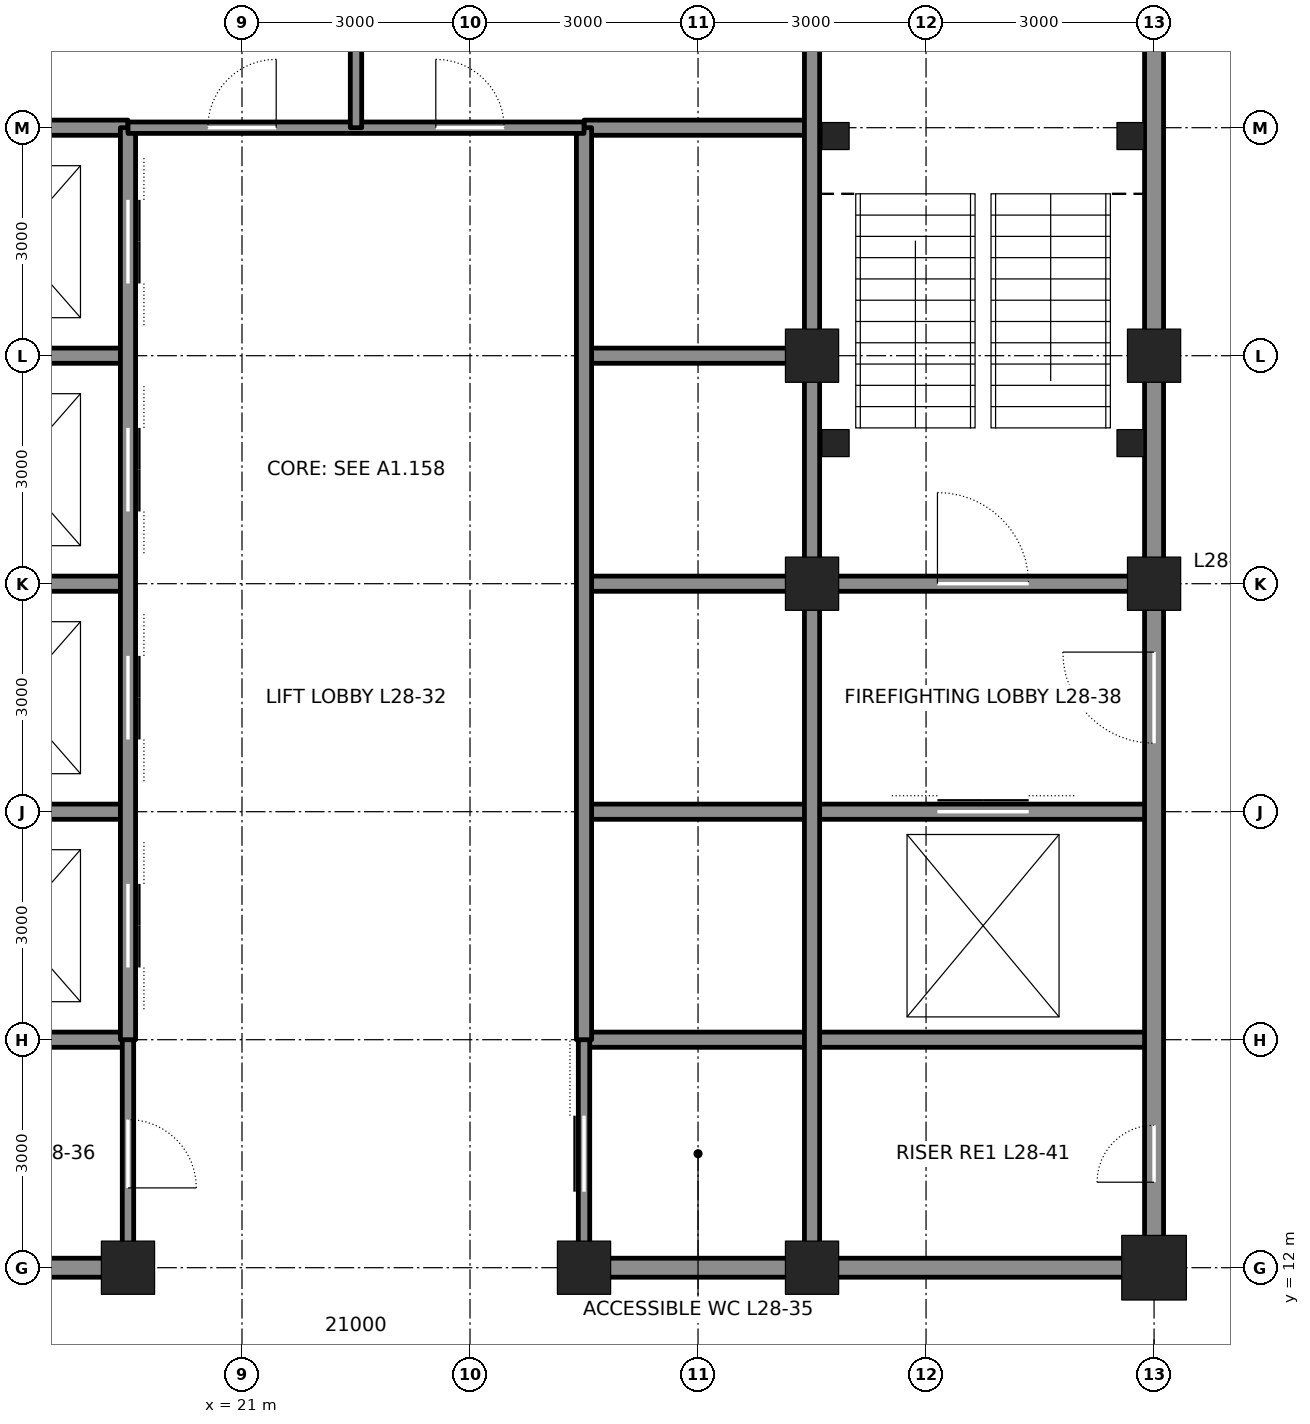
"""IFC4 building model, lengths in metres.
Left out: names, types, materials, properties, quantities, classifications, styles, units other than length and angle.
Written with IfcOpenShell. Run it as: python <this file> out.ifc"""

import sys

from ifc_helpers import new_model, si_unit, direction, frame, frame_2d, origin, origin_2d, place, context, subcontext, project, spatial, rectangle, hollow_rectangle, extrude, element, fill, save


model = new_model("IFC4")
c1 = context("Model", 3, precision=1e-05, world=origin(), true_north=direction((0.0, 1.0)))
c2 = subcontext(c1, "Body", "Model", "MODEL_VIEW")
j1 = project(units=[si_unit("LENGTHUNIT", "METRE"), si_unit("PLANEANGLEUNIT", "RADIAN")], contexts=[c1])
p1 = place(None, origin())
s1 = spatial("IfcSite", under=j1, at=p1, CompositionType="ELEMENT")
p2 = place(p1, origin())
s2 = spatial("IfcBuilding", under=s1, at=p2, CompositionType="ELEMENT")
p3 = place(p2, frame((0.0, 0.0, 132.0)))
s3 = spatial("IfcBuildingStorey", under=s2, at=p3, CompositionType="ELEMENT", Elevation=132.0)
for number, where, z_axis, x_axis in (
    (1, (19.5, 12.0, 0.0), (0.0, 0.0, 1.0), (1.0, 0.0, 0.0)),
    (2, (25.5, 12.0, 0.0), (0.0, 0.0, 1.0), (1.0, 0.0, 0.0)),
    (3, (28.5, 12.0, 0.0), (0.0, 0.0, 1.0), (1.0, 0.0, 0.0)),
):
    element("IfcColumn", number, at=place(p3, frame(where, z_axis=z_axis, x_axis=x_axis)), inside=s3, PredefinedType="COLUMN", context=c2, shape_type="SweptSolid", body=[
        extrude(hollow_rectangle(XDim=0.7, YDim=0.7, WallThickness=0.07, at=origin_2d()), origin(), (0.0, 0.0, 1.0), 4.2),
    ])
p4 = place(p3, frame((33.0, 12.0, 0.0), z_axis=(0.0, 0.0, 1.0), x_axis=(1.0, 0.0, 0.0)))
e4 = element("IfcColumn", 4, at=p4, inside=s3, PredefinedType="COLUMN", context=c2, shape_type="SweptSolid", body=[
    extrude(hollow_rectangle(XDim=0.85, YDim=0.85, WallThickness=0.085, at=origin_2d()), origin(), (0.0, 0.0, 1.0), 4.2),
])
for number, where, z_axis, x_axis in (
    (5, (33.0, 21.0, 0.0), (0.0, 0.0, 1.0), (1.0, 0.0, 0.0)),
    (6, (33.0, 24.0, 0.0), (0.0, 0.0, 1.0), (1.0, 0.0, 0.0)),
    (7, (28.5, 21.0, 0.0), (0.0, 0.0, 1.0), (1.0, 0.0, 0.0)),
    (8, (28.5, 24.0, 0.0), (0.0, 0.0, 1.0), (1.0, 0.0, 0.0)),
):
    element("IfcColumn", number, at=place(p3, frame(where, z_axis=z_axis, x_axis=x_axis)), inside=s3, PredefinedType="COLUMN", context=c2, shape_type="SweptSolid", body=[
        extrude(hollow_rectangle(XDim=0.7, YDim=0.7, WallThickness=0.07, at=origin_2d()), origin(), (0.0, 0.0, 1.0), 4.2),
    ])
for number, where, z_axis, x_axis in (
    (9, (16.75, 12.0, 0.0), (0.0, 0.0, 1.0), (1.0, 0.0, 0.0)),
    (10, (25.75, 12.0, 0.0), (0.0, 0.0, 1.0), (1.0, 0.0, 0.0)),
):
    element("IfcWall", number, at=place(p3, frame(where, z_axis=z_axis, x_axis=x_axis)), inside=s3, PredefinedType="SOLIDWALL", context=c2, shape_type="SweptSolid", body=[
        extrude(rectangle(XDim=2.5, YDim=0.25, at=frame_2d((1.25, 0.0))), origin(), (0.0, 0.0, 1.0), 3.181),
    ])
p5 = place(p3, frame((28.75, 12.0, 0.0), z_axis=(0.0, 0.0, 1.0), x_axis=(1.0, 0.0, 0.0)))
e11 = element("IfcWall", 11, at=p5, inside=s3, PredefinedType="SOLIDWALL", context=c2, shape_type="SweptSolid", body=[
    extrude(rectangle(XDim=4.0, YDim=0.25, at=frame_2d((2.0, 0.0))), origin(), (0.0, 0.0, 1.0), 3.181),
])
for number, where, z_axis, x_axis in (
    (12, (12.0, 15.0, 0.0), (0.0, 0.0, 1.0), (1.0, 0.0, 0.0)),
    (13, (25.5, 15.0, 0.0), (0.0, 0.0, 1.0), (1.0, 0.0, 0.0)),
):
    element("IfcWall", number, at=place(p3, frame(where, z_axis=z_axis, x_axis=x_axis)), inside=s3, PredefinedType="SOLIDWALL", context=c2, shape_type="SweptSolid", body=[
        extrude(rectangle(XDim=7.5, YDim=0.2, at=frame_2d((3.75, 0.0))), origin(), (0.0, 0.0, 1.0), 4.04),
    ])
for number, where, z_axis, x_axis in (
    (14, (16.75, 24.0, 0.0), (0.0, 0.0, 1.0), (1.0, 0.0, 0.0)),
    (15, (25.5, 24.0, 0.0), (0.0, 0.0, 1.0), (1.0, 0.0, 0.0)),
):
    element("IfcWall", number, at=place(p3, frame(where, z_axis=z_axis, x_axis=x_axis)), inside=s3, PredefinedType="SOLIDWALL", context=c2, shape_type="SweptSolid", body=[
        extrude(rectangle(XDim=2.75, YDim=0.2, at=frame_2d((1.375, 0.0))), origin(), (0.0, 0.0, 1.0), 3.09),
    ])
p6 = place(p3, frame((12.0, 27.0, 0.0), z_axis=(0.0, 0.0, 1.0), x_axis=(1.0, 0.0, 0.0)))
e16 = element("IfcWall", 16, at=p6, inside=s3, PredefinedType="SOLIDWALL", context=c2, shape_type="SweptSolid", body=[
    extrude(rectangle(XDim=7.5, YDim=0.2, at=frame_2d((3.75, 0.0))), origin(), (0.0, 0.0, 1.0), 4.04),
])
p7 = place(p6, frame((1.65, 0.0, 0.0)))
e17 = element("IfcOpeningElement", 17, at=p7, cuts=e16, PredefinedType="OPENING", context=c2, shape_type="SweptSolid", body=[
    extrude(rectangle(XDim=1.2, YDim=2.1, at=frame_2d((0.6, 1.05))), frame((0.0, 0.11, 0.0), z_axis=(0.0, -1.0, 0.0), x_axis=(1.0, 0.0, 0.0)), (0.0, 0.0, 1.0), 0.22),
])
for number, where, z_axis, x_axis in (
    (18, (25.5, 27.0, 0.0), (0.0, 0.0, 1.0), (1.0, 0.0, 0.0)),
    (19, (16.5, 18.0, 0.0), (0.0, 0.0, 1.0), (1.0, 0.0, 0.0)),
):
    element("IfcWall", number, at=place(p3, frame(where, z_axis=z_axis, x_axis=x_axis)), inside=s3, PredefinedType="SOLIDWALL", context=c2, shape_type="SweptSolid", body=[
        extrude(rectangle(XDim=3.0, YDim=0.2, at=frame_2d((1.5, 0.0))), origin(), (0.0, 0.0, 1.0), 4.04),
    ])
p8 = place(p3, frame((25.5, 18.0, 0.0), z_axis=(0.0, 0.0, 1.0), x_axis=(1.0, 0.0, 0.0)))
e20 = element("IfcWall", 20, at=p8, inside=s3, PredefinedType="SOLIDWALL", context=c2, shape_type="SweptSolid", body=[
    extrude(rectangle(XDim=7.5, YDim=0.2, at=frame_2d((3.75, 0.0))), origin(), (0.0, 0.0, 1.0), 4.04),
])
p9 = place(p8, frame((4.65, 0.0, 0.0)))
e21 = element("IfcOpeningElement", 21, at=p9, cuts=e20, PredefinedType="OPENING", context=c2, shape_type="SweptSolid", body=[
    extrude(rectangle(XDim=1.2, YDim=2.1, at=frame_2d((0.6, 1.05))), frame((0.0, 0.11, 0.0), z_axis=(0.0, -1.0, 0.0), x_axis=(1.0, 0.0, 0.0)), (0.0, 0.0, 1.0), 0.22),
])
for number, where, z_axis, x_axis in (
    (22, (16.75, 21.0, 0.0), (0.0, 0.0, 1.0), (1.0, 0.0, 0.0)),
    (23, (25.5, 21.0, 0.0), (0.0, 0.0, 1.0), (1.0, 0.0, 0.0)),
):
    element("IfcWall", number, at=place(p3, frame(where, z_axis=z_axis, x_axis=x_axis)), inside=s3, PredefinedType="SOLIDWALL", context=c2, shape_type="SweptSolid", body=[
        extrude(rectangle(XDim=2.75, YDim=0.2, at=frame_2d((1.375, 0.0))), origin(), (0.0, 0.0, 1.0), 3.09),
    ])
p10 = place(p3, frame((28.75, 21.0, 0.0), z_axis=(0.0, 0.0, 1.0), x_axis=(1.0, 0.0, 0.0)))
e24 = element("IfcWall", 24, at=p10, inside=s3, PredefinedType="SOLIDWALL", context=c2, shape_type="SweptSolid", body=[
    extrude(rectangle(XDim=4.0, YDim=0.2, at=frame_2d((2.0, 0.0))), origin(), (0.0, 0.0, 1.0), 3.09),
])
p11 = place(p10, frame((1.4, 0.0, 0.0)))
e25 = element("IfcOpeningElement", 25, at=p11, cuts=e24, PredefinedType="OPENING", context=c2, shape_type="SweptSolid", body=[
    extrude(rectangle(XDim=1.2, YDim=2.1, at=frame_2d((0.6, 1.05))), frame((0.0, 0.11, 0.0), z_axis=(0.0, -1.0, 0.0), x_axis=(1.0, 0.0, 0.0)), (0.0, 0.0, 1.0), 0.22),
])
p12 = place(p3, frame((19.5, 12.25, 0.0), z_axis=(0.0, 0.0, 1.0), x_axis=(0.0, 1.0, 0.0)))
e26 = element("IfcWall", 26, at=p12, inside=s3, PredefinedType="PARTITIONING", context=c2, shape_type="SweptSolid", body=[
    extrude(rectangle(XDim=2.75, YDim=0.15, at=frame_2d((1.375, 0.0))), origin(), (0.0, 0.0, 1.0), 3.065),
])
p13 = place(p12, frame((0.8, 0.0, 0.0)))
e27 = element("IfcOpeningElement", 27, at=p13, cuts=e26, PredefinedType="OPENING", context=c2, shape_type="SweptSolid", body=[
    extrude(rectangle(XDim=0.9, YDim=2.1, at=frame_2d((0.45, 1.05))), frame((0.0, 0.085, 0.0), z_axis=(0.0, -1.0, 0.0), x_axis=(1.0, 0.0, 0.0)), (0.0, 0.0, 1.0), 0.17),
])
p14 = place(p3, frame((19.5, 15.0, 0.0), z_axis=(0.0, 0.0, 1.0), x_axis=(0.0, 1.0, 0.0)))
e28 = element("IfcWall", 28, at=p14, inside=s3, PredefinedType="SOLIDWALL", context=c2, shape_type="SweptSolid", body=[
    extrude(rectangle(XDim=12.0, YDim=0.2, at=frame_2d((6.0, 0.0))), origin(), (0.0, 0.0, 1.0), 3.065),
])
p15 = place(p14, frame((0.95, 0.0, 0.0)))
e29 = element("IfcOpeningElement", 29, at=p15, cuts=e28, PredefinedType="OPENING", context=c2, shape_type="SweptSolid", body=[
    extrude(rectangle(XDim=1.1, YDim=2.1, at=frame_2d((0.55, 1.05))), frame((0.0, 0.11, 0.0), z_axis=(0.0, -1.0, 0.0), x_axis=(1.0, 0.0, 0.0)), (0.0, 0.0, 1.0), 0.22),
])
p16 = place(p14, frame((3.95, 0.0, 0.0)))
e30 = element("IfcOpeningElement", 30, at=p16, cuts=e28, PredefinedType="OPENING", context=c2, shape_type="SweptSolid", body=[
    extrude(rectangle(XDim=1.1, YDim=2.1, at=frame_2d((0.55, 1.05))), frame((0.0, 0.11, 0.0), z_axis=(0.0, -1.0, 0.0), x_axis=(1.0, 0.0, 0.0)), (0.0, 0.0, 1.0), 0.22),
])
p17 = place(p14, frame((6.95, 0.0, 0.0)))
e31 = element("IfcOpeningElement", 31, at=p17, cuts=e28, PredefinedType="OPENING", context=c2, shape_type="SweptSolid", body=[
    extrude(rectangle(XDim=1.1, YDim=2.1, at=frame_2d((0.55, 1.05))), frame((0.0, 0.11, 0.0), z_axis=(0.0, -1.0, 0.0), x_axis=(1.0, 0.0, 0.0)), (0.0, 0.0, 1.0), 0.22),
])
p18 = place(p14, frame((9.95, 0.0, 0.0)))
e32 = element("IfcOpeningElement", 32, at=p18, cuts=e28, PredefinedType="OPENING", context=c2, shape_type="SweptSolid", body=[
    extrude(rectangle(XDim=1.1, YDim=2.1, at=frame_2d((0.55, 1.05))), frame((0.0, 0.11, 0.0), z_axis=(0.0, -1.0, 0.0), x_axis=(1.0, 0.0, 0.0)), (0.0, 0.0, 1.0), 0.22),
])
p19 = place(p3, frame((25.5, 12.25, 0.0), z_axis=(0.0, 0.0, 1.0), x_axis=(0.0, 1.0, 0.0)))
e33 = element("IfcWall", 33, at=p19, inside=s3, PredefinedType="PARTITIONING", context=c2, shape_type="SweptSolid", body=[
    extrude(rectangle(XDim=2.75, YDim=0.15, at=frame_2d((1.375, 0.0))), origin(), (0.0, 0.0, 1.0), 3.065),
])
p20 = place(p19, frame((0.75, 0.0, 0.0)))
e34 = element("IfcOpeningElement", 34, at=p20, cuts=e33, PredefinedType="OPENING", context=c2, shape_type="SweptSolid", body=[
    extrude(rectangle(XDim=1.0, YDim=2.1, at=frame_2d((0.5, 1.05))), frame((0.0, 0.085, 0.0), z_axis=(0.0, -1.0, 0.0), x_axis=(1.0, 0.0, 0.0)), (0.0, 0.0, 1.0), 0.17),
])
p21 = place(p3, frame((25.5, 15.0, 0.0), z_axis=(0.0, 0.0, 1.0), x_axis=(0.0, 1.0, 0.0)))
e35 = element("IfcWall", 35, at=p21, inside=s3, PredefinedType="SOLIDWALL", context=c2, shape_type="SweptSolid", body=[
    extrude(rectangle(XDim=12.0, YDim=0.2, at=frame_2d((6.0, 0.0))), origin(), (0.0, 0.0, 1.0), 3.065),
])
p22 = place(p3, frame((28.5, 12.25, 0.0), z_axis=(0.0, 0.0, 1.0), x_axis=(0.0, 1.0, 0.0)))
e36 = element("IfcWall", 36, at=p22, inside=s3, PredefinedType="SOLIDWALL", context=c2, shape_type="SweptSolid", body=[
    extrude(rectangle(XDim=8.5, YDim=0.2, at=frame_2d((4.25, 0.0))), origin(), (0.0, 0.0, 1.0), 3.113),
])
p23 = place(p3, frame((28.5, 21.25, 0.0), z_axis=(0.0, 0.0, 1.0), x_axis=(0.0, 1.0, 0.0)))
e37 = element("IfcWall", 37, at=p23, inside=s3, PredefinedType="SOLIDWALL", context=c2, shape_type="SweptSolid", body=[
    extrude(rectangle(XDim=2.5, YDim=0.2, at=frame_2d((1.25, 0.0))), origin(), (0.0, 0.0, 1.0), 3.113),
])
p24 = place(p3, frame((28.5, 24.25, 0.0), z_axis=(0.0, 0.0, 1.0), x_axis=(0.0, 1.0, 0.0)))
e38 = element("IfcWall", 38, at=p24, inside=s3, PredefinedType="SOLIDWALL", context=c2, shape_type="SweptSolid", body=[
    extrude(rectangle(XDim=8.5, YDim=0.2, at=frame_2d((4.25, 0.0))), origin(), (0.0, 0.0, 1.0), 3.113),
])
p25 = place(p3, frame((33.0, 12.25, 0.0), z_axis=(0.0, 0.0, 1.0), x_axis=(0.0, 1.0, 0.0)))
e39 = element("IfcWall", 39, at=p25, inside=s3, PredefinedType="SOLIDWALL", context=c2, shape_type="SweptSolid", body=[
    extrude(rectangle(XDim=8.5, YDim=0.25, at=frame_2d((4.25, 0.0))), origin(), (0.0, 0.0, 1.0), 3.113),
])
p26 = place(p25, frame((6.65, 0.0, 0.0)))
e40 = element("IfcOpeningElement", 40, at=p26, cuts=e39, PredefinedType="OPENING", context=c2, shape_type="SweptSolid", body=[
    extrude(rectangle(XDim=1.2, YDim=2.1, at=frame_2d((0.6, 1.05))), frame((0.0, 0.135, 0.0), z_axis=(0.0, -1.0, 0.0), x_axis=(1.0, 0.0, 0.0)), (0.0, 0.0, 1.0), 0.27),
])
p27 = place(p25, frame((0.875, 0.0, 0.0)))
e41 = element("IfcOpeningElement", 41, at=p27, cuts=e39, PredefinedType="OPENING", context=c2, shape_type="SweptSolid", body=[
    extrude(rectangle(XDim=0.75, YDim=2.1, at=frame_2d((0.375, 1.05))), frame((0.0, 0.135, 0.0), z_axis=(0.0, -1.0, 0.0), x_axis=(1.0, 0.0, 0.0)), (0.0, 0.0, 1.0), 0.27),
])
p28 = place(p3, frame((33.0, 21.25, 0.0), z_axis=(0.0, 0.0, 1.0), x_axis=(0.0, 1.0, 0.0)))
e42 = element("IfcWall", 42, at=p28, inside=s3, PredefinedType="SOLIDWALL", context=c2, shape_type="SweptSolid", body=[
    extrude(rectangle(XDim=2.5, YDim=0.25, at=frame_2d((1.25, 0.0))), origin(), (0.0, 0.0, 1.0), 3.113),
])
p29 = place(p3, frame((33.0, 24.25, 0.0), z_axis=(0.0, 0.0, 1.0), x_axis=(0.0, 1.0, 0.0)))
e43 = element("IfcWall", 43, at=p29, inside=s3, PredefinedType="SOLIDWALL", context=c2, shape_type="SweptSolid", body=[
    extrude(rectangle(XDim=8.5, YDim=0.25, at=frame_2d((4.25, 0.0))), origin(), (0.0, 0.0, 1.0), 3.113),
])
p30 = place(p29, frame((6.875, 0.0, 0.0)))
e44 = element("IfcOpeningElement", 44, at=p30, cuts=e43, PredefinedType="OPENING", context=c2, shape_type="SweptSolid", body=[
    extrude(rectangle(XDim=0.75, YDim=2.1, at=frame_2d((0.375, 1.05))), frame((0.0, 0.135, 0.0), z_axis=(0.0, -1.0, 0.0), x_axis=(1.0, 0.0, 0.0)), (0.0, 0.0, 1.0), 0.27),
])
p31 = place(p3, frame((19.5, 27.0, 0.0), z_axis=(0.0, 0.0, 1.0), x_axis=(1.0, 0.0, 0.0)))
e45 = element("IfcWall", 45, at=p31, inside=s3, PredefinedType="PARTITIONING", context=c2, shape_type="SweptSolid", body=[
    extrude(rectangle(XDim=6.0, YDim=0.15, at=frame_2d((3.0, 0.0))), origin(), (0.0, 0.0, 1.0), 4.04),
])
p32 = place(p31, frame((1.05, 0.0, 0.0)))
e46 = element("IfcOpeningElement", 46, at=p32, cuts=e45, PredefinedType="OPENING", context=c2, shape_type="SweptSolid", body=[
    extrude(rectangle(XDim=0.9, YDim=2.1, at=frame_2d((0.45, 1.05))), frame((0.0, 0.085, 0.0), z_axis=(0.0, -1.0, 0.0), x_axis=(1.0, 0.0, 0.0)), (0.0, 0.0, 1.0), 0.17),
])
p33 = place(p31, frame((4.05, 0.0, 0.0)))
e47 = element("IfcOpeningElement", 47, at=p33, cuts=e45, PredefinedType="OPENING", context=c2, shape_type="SweptSolid", body=[
    extrude(rectangle(XDim=0.9, YDim=2.1, at=frame_2d((0.45, 1.05))), frame((0.0, 0.085, 0.0), z_axis=(0.0, -1.0, 0.0), x_axis=(1.0, 0.0, 0.0)), (0.0, 0.0, 1.0), 0.17),
])
p34 = place(p3, frame((22.5, 27.0, 0.0), z_axis=(0.0, 0.0, 1.0), x_axis=(0.0, 1.0, 0.0)))
e48 = element("IfcWall", 48, at=p34, inside=s3, PredefinedType="PARTITIONING", context=c2, shape_type="SweptSolid", body=[
    extrude(rectangle(XDim=6.0, YDim=0.15, at=frame_2d((3.0, 0.0))), origin(), (0.0, 0.0, 1.0), 4.04),
])
for number, where, z_axis, x_axis in (
    (49, (28.81, 26.89, 0.0), (0.0, 0.0, 1.0), (1.0, 0.0, 0.0)),
    (50, (32.69, 26.89, 0.0), (0.0, 0.0, 1.0), (1.0, 0.0, 0.0)),
    (51, (28.81, 22.85, 0.0), (0.0, 0.0, 1.0), (1.0, 0.0, 0.0)),
    (52, (32.69, 22.85, 0.0), (0.0, 0.0, 1.0), (1.0, 0.0, 0.0)),
):
    element("IfcColumn", number, at=place(p3, frame(where, z_axis=z_axis, x_axis=x_axis)), inside=s3, PredefinedType="COLUMN", context=c2, shape_type="SweptSolid", body=[
        extrude(hollow_rectangle(XDim=0.356, YDim=0.356, WallThickness=0.015, at=origin_2d()), origin(), (0.0, 0.0, 1.0), 4.2),
    ])
p35 = place(p11, origin())
e53 = element("IfcDoor", 53, at=p35, inside=s3, OperationType="SINGLE_SWING_LEFT", PredefinedType="DOOR", context=c2, shape_type="SweptSolid", body=[
    extrude(rectangle(XDim=1.2, YDim=2.1, at=frame_2d((0.6, 1.05))), frame((0.0, 0.025, 0.0), z_axis=(0.0, -1.0, 0.0), x_axis=(1.0, 0.0, 0.0)), (0.0, 0.0, 1.0), 0.05),
])
fill(e25, e53)
p36 = place(p26, origin())
e54 = element("IfcDoor", 54, at=p36, inside=s3, OperationType="SINGLE_SWING_RIGHT", PredefinedType="DOOR", context=c2, shape_type="SweptSolid", body=[
    extrude(rectangle(XDim=1.2, YDim=2.1, at=frame_2d((0.6, 1.05))), frame((0.0, 0.025, 0.0), z_axis=(0.0, -1.0, 0.0), x_axis=(1.0, 0.0, 0.0)), (0.0, 0.0, 1.0), 0.05),
])
fill(e40, e54)
p37 = place(p9, origin())
e55 = element("IfcDoor", 55, at=p37, inside=s3, OperationType="DOUBLE_DOOR_SLIDING", PredefinedType="DOOR", context=c2, shape_type="SweptSolid", body=[
    extrude(rectangle(XDim=1.2, YDim=2.1, at=frame_2d((0.6, 1.05))), frame((0.0, 0.025, 0.0), z_axis=(0.0, -1.0, 0.0), x_axis=(1.0, 0.0, 0.0)), (0.0, 0.0, 1.0), 0.05),
])
fill(e21, e55)
p38 = place(p27, origin())
e56 = element("IfcDoor", 56, at=p38, inside=s3, OperationType="SINGLE_SWING_LEFT", PredefinedType="DOOR", context=c2, shape_type="SweptSolid", body=[
    extrude(rectangle(XDim=0.75, YDim=2.1, at=frame_2d((0.375, 1.05))), frame((0.0, 0.025, 0.0), z_axis=(0.0, -1.0, 0.0), x_axis=(1.0, 0.0, 0.0)), (0.0, 0.0, 1.0), 0.05),
])
fill(e41, e56)
p39 = place(p32, origin())
e57 = element("IfcDoor", 57, at=p39, inside=s3, OperationType="SINGLE_SWING_RIGHT", PredefinedType="DOOR", context=c2, shape_type="SweptSolid", body=[
    extrude(rectangle(XDim=0.9, YDim=2.1, at=frame_2d((0.45, 1.05))), frame((0.0, 0.025, 0.0), z_axis=(0.0, -1.0, 0.0), x_axis=(1.0, 0.0, 0.0)), (0.0, 0.0, 1.0), 0.05),
])
fill(e46, e57)
p40 = place(p33, origin())
e58 = element("IfcDoor", 58, at=p40, inside=s3, OperationType="SINGLE_SWING_LEFT", PredefinedType="DOOR", context=c2, shape_type="SweptSolid", body=[
    extrude(rectangle(XDim=0.9, YDim=2.1, at=frame_2d((0.45, 1.05))), frame((0.0, 0.025, 0.0), z_axis=(0.0, -1.0, 0.0), x_axis=(1.0, 0.0, 0.0)), (0.0, 0.0, 1.0), 0.05),
])
fill(e47, e58)
p41 = place(p20, origin())
e59 = element("IfcDoor", 59, at=p41, inside=s3, OperationType="SLIDING_TO_LEFT", PredefinedType="DOOR", context=c2, shape_type="SweptSolid", body=[
    extrude(rectangle(XDim=1.0, YDim=2.1, at=frame_2d((0.5, 1.05))), frame((0.0, 0.025, 0.0), z_axis=(0.0, -1.0, 0.0), x_axis=(1.0, 0.0, 0.0)), (0.0, 0.0, 1.0), 0.05),
])
fill(e34, e59)
p42 = place(p13, frame((0.9, 0.0, 0.0), z_axis=(0.0, 0.0, 1.0), x_axis=(-1.0, 0.0, 0.0)))
e60 = element("IfcDoor", 60, at=p42, inside=s3, OperationType="SINGLE_SWING_RIGHT", PredefinedType="DOOR", context=c2, shape_type="SweptSolid", body=[
    extrude(rectangle(XDim=0.9, YDim=2.1, at=frame_2d((0.45, 1.05))), frame((0.0, 0.025, 0.0), z_axis=(0.0, -1.0, 0.0), x_axis=(1.0, 0.0, 0.0)), (0.0, 0.0, 1.0), 0.05),
])
fill(e27, e60)
p43 = place(p15, origin())
e61 = element("IfcDoor", 61, at=p43, inside=s3, OperationType="DOUBLE_DOOR_SLIDING", PredefinedType="DOOR", context=c2, shape_type="SweptSolid", body=[
    extrude(rectangle(XDim=1.1, YDim=2.1, at=frame_2d((0.55, 1.05))), frame((0.0, 0.025, 0.0), z_axis=(0.0, -1.0, 0.0), x_axis=(1.0, 0.0, 0.0)), (0.0, 0.0, 1.0), 0.05),
])
fill(e29, e61)
p44 = place(p16, origin())
e62 = element("IfcDoor", 62, at=p44, inside=s3, OperationType="DOUBLE_DOOR_SLIDING", PredefinedType="DOOR", context=c2, shape_type="SweptSolid", body=[
    extrude(rectangle(XDim=1.1, YDim=2.1, at=frame_2d((0.55, 1.05))), frame((0.0, 0.025, 0.0), z_axis=(0.0, -1.0, 0.0), x_axis=(1.0, 0.0, 0.0)), (0.0, 0.0, 1.0), 0.05),
])
fill(e30, e62)
p45 = place(p17, origin())
e63 = element("IfcDoor", 63, at=p45, inside=s3, OperationType="DOUBLE_DOOR_SLIDING", PredefinedType="DOOR", context=c2, shape_type="SweptSolid", body=[
    extrude(rectangle(XDim=1.1, YDim=2.1, at=frame_2d((0.55, 1.05))), frame((0.0, 0.025, 0.0), z_axis=(0.0, -1.0, 0.0), x_axis=(1.0, 0.0, 0.0)), (0.0, 0.0, 1.0), 0.05),
])
fill(e31, e63)
p46 = place(p18, origin())
e64 = element("IfcDoor", 64, at=p46, inside=s3, OperationType="DOUBLE_DOOR_SLIDING", PredefinedType="DOOR", context=c2, shape_type="SweptSolid", body=[
    extrude(rectangle(XDim=1.1, YDim=2.1, at=frame_2d((0.55, 1.05))), frame((0.0, 0.025, 0.0), z_axis=(0.0, -1.0, 0.0), x_axis=(1.0, 0.0, 0.0)), (0.0, 0.0, 1.0), 0.05),
])
fill(e32, e64)
save(model, sys.argv[1])
